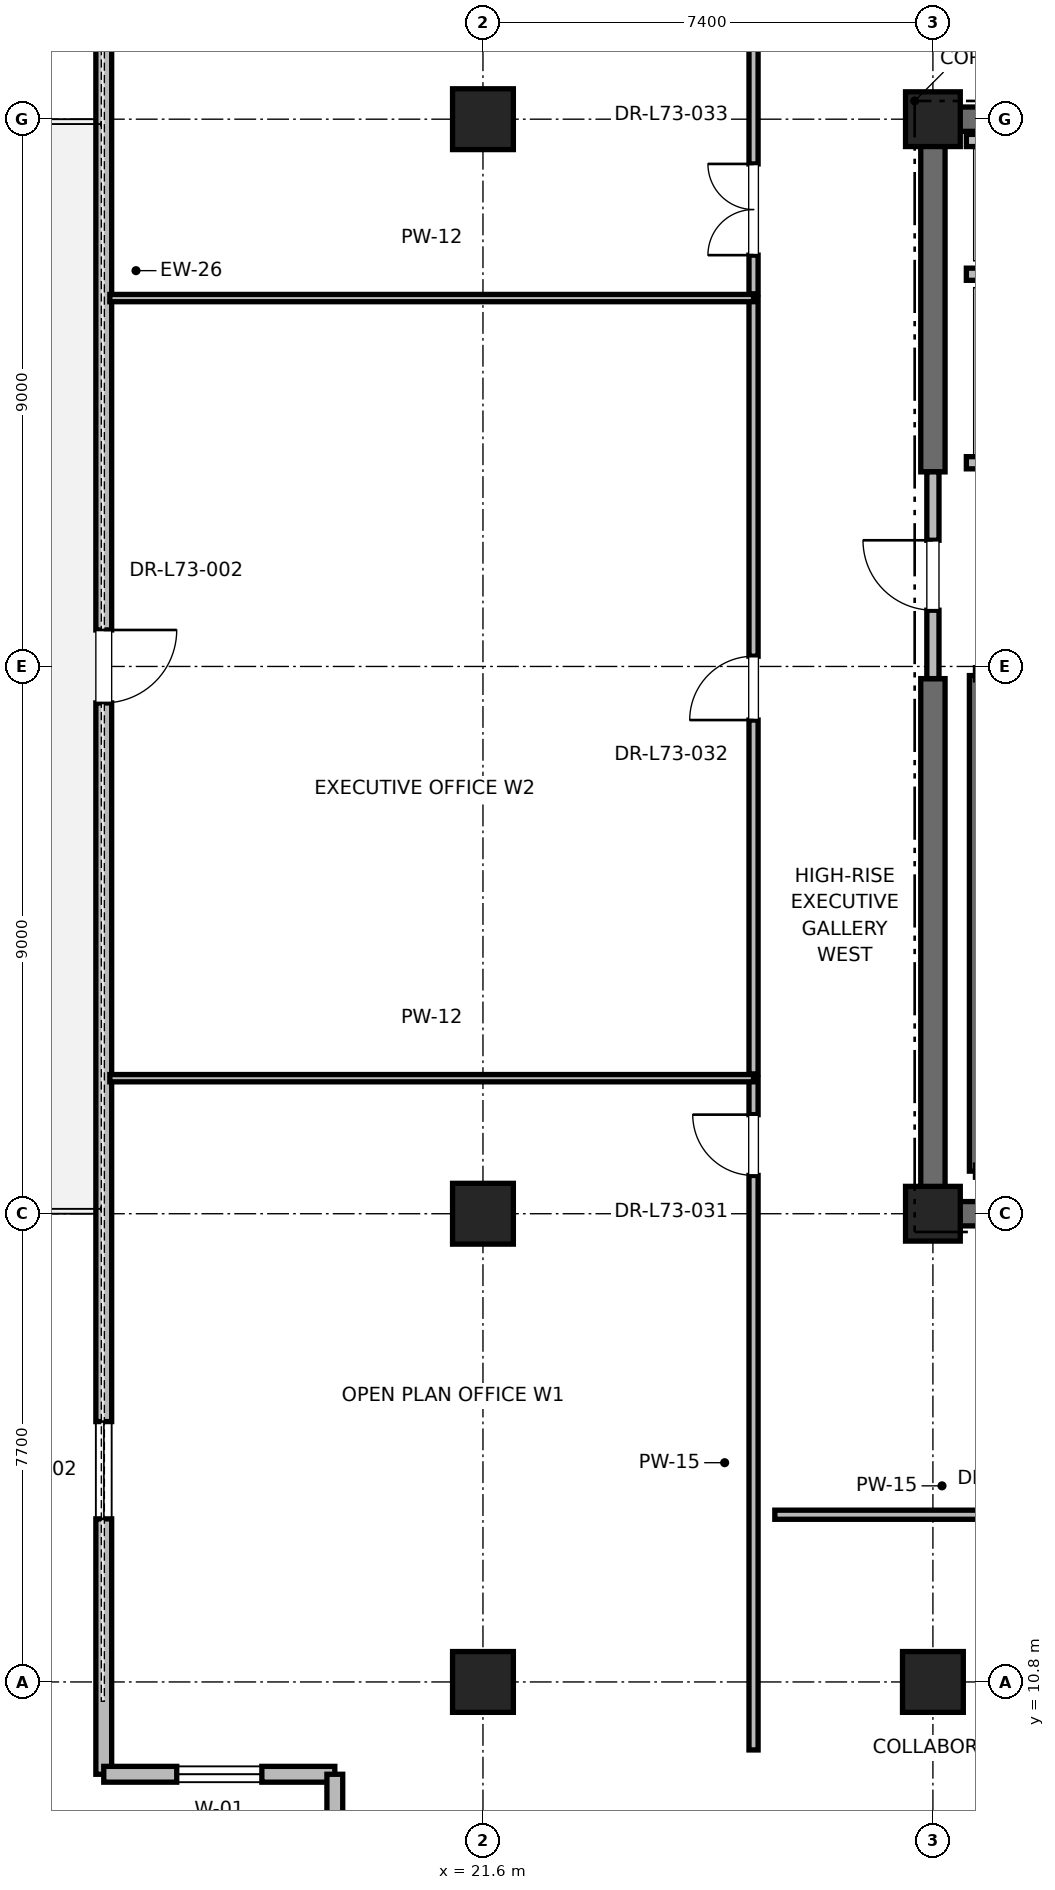
"""IFC4 building model, lengths in metres.
Left out: names, types, materials, properties, quantities, classifications, styles, units other than length and angle.
Written with IfcOpenShell. Run it as: python <this file> out.ifc"""

import sys

from ifc_helpers import new_model, si_unit, direction, frame, frame_2d, origin, origin_2d, place, context, subcontext, project, spatial, rectangle, extrude, element, fill, save


model = new_model("IFC4")
c1 = context("Model", 3, precision=1e-05, world=origin(), true_north=direction((0.0, 1.0)))
c2 = subcontext(c1, "Body", "Model", "MODEL_VIEW")
j1 = project(units=[si_unit("LENGTHUNIT", "METRE"), si_unit("PLANEANGLEUNIT", "RADIAN")], contexts=[c1])
p1 = place(None, origin())
s1 = spatial("IfcSite", under=j1, at=p1, CompositionType="ELEMENT")
p2 = place(p1, origin())
s2 = spatial("IfcBuilding", under=s1, at=p2, CompositionType="ELEMENT")
p3 = place(p2, frame((0.0, 0.0, 314.8)))
s3 = spatial("IfcBuildingStorey", under=s2, at=p3, CompositionType="ELEMENT", Elevation=314.8)
for number, where, z_axis, x_axis in (
    (1, (29.0, 10.8, 0.0), (0.0, 0.0, 1.0), (1.0, 0.0, 0.0)),
    (2, (21.6, 18.5, 0.0), (0.0, 0.0, 1.0), (1.0, 0.0, 0.0)),
    (3, (21.6, 36.5, 0.0), (0.0, 0.0, 1.0), (1.0, 0.0, 0.0)),
    (4, (21.6, 10.8, 0.0), (0.0, 0.0, 1.0), (1.0, 0.0, 0.0)),
):
    element("IfcColumn", number, at=place(p3, frame(where, z_axis=z_axis, x_axis=x_axis)), inside=s3, PredefinedType="COLUMN", context=c2, shape_type="SweptSolid", body=[
        extrude(rectangle(XDim=1.0, YDim=1.0, at=origin_2d()), origin(), (0.0, 0.0, 1.0), 4.0),
    ])
for number, where, z_axis, x_axis in (
    (5, (29.0, 18.5, 0.0), (0.0, 0.0, 1.0), (1.0, 0.0, 0.0)),
    (6, (29.0, 36.5, 0.0), (0.0, 0.0, 1.0), (1.0, 0.0, 0.0)),
):
    element("IfcColumn", number, at=place(p3, frame(where, z_axis=z_axis, x_axis=x_axis)), inside=s3, PredefinedType="PILASTER", context=c2, shape_type="SweptSolid", body=[
        extrude(rectangle(XDim=0.9, YDim=0.9, at=origin_2d()), origin(), (0.0, 0.0, 1.0), 4.0),
    ])
p4 = place(p3, frame((29.0, 18.5, 0.0), z_axis=(0.0, 0.0, 1.0), x_axis=(1.0, 0.0, 0.0)))
e7 = element("IfcWall", 7, at=p4, inside=s3, PredefinedType="SHEAR", context=c2, shape_type="SweptSolid", body=[
    extrude(rectangle(XDim=9.2, YDim=0.4, at=frame_2d((4.6, 0.0))), origin(), (0.0, 0.0, 1.0), 3.785),
])
p5 = place(p3, frame((29.0, 36.5, 0.0), z_axis=(0.0, 0.0, 1.0), x_axis=(1.0, 0.0, 0.0)))
e8 = element("IfcWall", 8, at=p5, inside=s3, PredefinedType="SHEAR", context=c2, shape_type="SweptSolid", body=[
    extrude(rectangle(XDim=5.8, YDim=0.4, at=frame_2d((2.9, 0.0))), origin(), (0.0, 0.0, 1.0), 3.785),
])
p6 = place(p3, frame((29.0, 18.5, 0.0), z_axis=(0.0, 0.0, 1.0), x_axis=(0.0, 1.0, 0.0)))
e9 = element("IfcWall", 9, at=p6, inside=s3, PredefinedType="SHEAR", context=c2, shape_type="SweptSolid", body=[
    extrude(rectangle(XDim=8.8, YDim=0.4, at=frame_2d((4.4, 0.0))), origin(), (0.0, 0.0, 1.0), 3.785),
])
p7 = place(p3, frame((29.0, 30.7, 0.0), z_axis=(0.0, 0.0, 1.0), x_axis=(0.0, 1.0, 0.0)))
e10 = element("IfcWall", 10, at=p7, inside=s3, PredefinedType="SHEAR", context=c2, shape_type="SweptSolid", body=[
    extrude(rectangle(XDim=5.8, YDim=0.4, at=frame_2d((2.9, 0.0))), origin(), (0.0, 0.0, 1.0), 3.785),
])
p8 = place(p3, frame((15.364, 45.718, 0.0), z_axis=(0.0, 0.0, 1.0), x_axis=(0.0, -1.0, 0.0)))
e11 = element("IfcWall", 11, at=p8, inside=s3, PredefinedType="PARAPET", context=c2, shape_type="SweptSolid", body=[
    extrude(rectangle(XDim=36.437, YDim=0.26, at=frame_2d((18.218, 0.0))), origin(), (0.0, 0.0, 1.0), 3.196),
])
p9 = place(p8, frame((4.2, 0.0, 0.85)))
e12 = element("IfcOpeningElement", 12, at=p9, cuts=e11, PredefinedType="OPENING", context=c2, shape_type="SweptSolid", body=[
    extrude(rectangle(XDim=1.6, YDim=2.1, at=frame_2d((0.8, 1.05))), frame((0.0, 0.13, 0.0), z_axis=(0.0, -1.0, 0.0), x_axis=(1.0, 0.0, 0.0)), (0.0, 0.0, 1.0), 0.26),
])
p10 = place(p8, frame((17.618, 0.0, 0.0)))
e13 = element("IfcOpeningElement", 13, at=p10, cuts=e11, PredefinedType="OPENING", context=c2, shape_type="SweptSolid", body=[
    extrude(rectangle(XDim=1.2, YDim=2.2, at=frame_2d((0.6, 1.1))), frame((0.0, 0.13, 0.0), z_axis=(0.0, -1.0, 0.0), x_axis=(1.0, 0.0, 0.0)), (0.0, 0.0, 1.0), 0.26),
])
p11 = place(p8, frame((30.636, 0.0, 0.85)))
e14 = element("IfcOpeningElement", 14, at=p11, cuts=e11, PredefinedType="OPENING", context=c2, shape_type="SweptSolid", body=[
    extrude(rectangle(XDim=1.6, YDim=2.1, at=frame_2d((0.8, 1.05))), frame((0.0, 0.13, 0.0), z_axis=(0.0, -1.0, 0.0), x_axis=(1.0, 0.0, 0.0)), (0.0, 0.0, 1.0), 0.26),
])
p12 = place(p3, frame((15.364, 9.282, 0.0), z_axis=(0.0, 0.0, 1.0), x_axis=(1.0, 0.0, 0.0)))
e15 = element("IfcWall", 15, at=p12, inside=s3, PredefinedType="PARAPET", context=c2, shape_type="SweptSolid", body=[
    extrude(rectangle(XDim=3.8, YDim=0.26, at=frame_2d((1.9, 0.0))), origin(), (0.0, 0.0, 1.0), 3.785),
])
p13 = place(p12, frame((1.2, 0.0, 0.85)))
e16 = element("IfcOpeningElement", 16, at=p13, cuts=e15, PredefinedType="OPENING", context=c2, shape_type="SweptSolid", body=[
    extrude(rectangle(XDim=1.4, YDim=2.0, at=frame_2d((0.7, 1.0))), frame((0.0, 0.13, 0.0), z_axis=(0.0, -1.0, 0.0), x_axis=(1.0, 0.0, 0.0)), (0.0, 0.0, 1.0), 0.26),
])
p14 = place(p3, frame((19.164, 9.282, 0.0), z_axis=(0.0, 0.0, 1.0), x_axis=(0.0, -1.0, 0.0)))
e17 = element("IfcWall", 17, at=p14, inside=s3, PredefinedType="PARAPET", context=c2, shape_type="SweptSolid", body=[
    extrude(rectangle(XDim=3.3, YDim=0.26, at=frame_2d((1.65, 0.0))), origin(), (0.0, 0.0, 1.0), 3.785),
])
p15 = place(p3, frame((29.7, 19.2, 0.0), z_axis=(0.0, 0.0, 1.0), x_axis=(0.0, 1.0, 0.0)))
e18 = element("IfcWall", 18, at=p15, inside=s3, PredefinedType="SOLIDWALL", context=c2, shape_type="SweptSolid", body=[
    extrude(rectangle(XDim=8.15, YDim=0.2, at=frame_2d((4.075, 0.0))), origin(), (0.0, 0.0, 1.0), 3.785),
])
p16 = place(p3, frame((29.0, 27.3, 0.0), z_axis=(0.0, 0.0, 1.0), x_axis=(0.0, 1.0, 0.0)))
e19 = element("IfcWall", 19, at=p16, inside=s3, PredefinedType="PARTITIONING", context=c2, shape_type="SweptSolid", body=[
    extrude(rectangle(XDim=3.4, YDim=0.2, at=frame_2d((1.7, 0.0))), origin(), (0.0, 0.0, 1.0), 2.865),
])
p17 = place(p16, frame((1.125, 0.0, 0.0)))
e20 = element("IfcOpeningElement", 20, at=p17, cuts=e19, PredefinedType="OPENING", context=c2, shape_type="SweptSolid", body=[
    extrude(rectangle(XDim=1.15, YDim=2.2, at=frame_2d((0.575, 1.1))), frame((0.0, 0.1, 0.0), z_axis=(0.0, -1.0, 0.0), x_axis=(1.0, 0.0, 0.0)), (0.0, 0.0, 1.0), 0.2),
])
p18 = place(p3, frame((29.55, 30.85, 0.0), z_axis=(0.0, 0.0, 1.0), x_axis=(1.0, 0.0, 0.0)))
e21 = element("IfcWall", 21, at=p18, inside=s3, PredefinedType="SOLIDWALL", context=c2, shape_type="SweptSolid", body=[
    extrude(rectangle(XDim=2.6, YDim=0.2, at=frame_2d((1.3, 0.0))), origin(), (0.0, 0.0, 1.0), 2.865),
])
p19 = place(p18, frame((0.75, 0.0, 0.0)))
e22 = element("IfcOpeningElement", 22, at=p19, cuts=e21, PredefinedType="OPENING", context=c2, shape_type="SweptSolid", body=[
    extrude(rectangle(XDim=1.1, YDim=2.2, at=frame_2d((0.55, 1.1))), frame((0.0, 0.1, 0.0), z_axis=(0.0, -1.0, 0.0), x_axis=(1.0, 0.0, 0.0)), (0.0, 0.0, 1.0), 0.2),
])
p20 = place(p3, frame((29.55, 33.95, 0.0), z_axis=(0.0, 0.0, 1.0), x_axis=(1.0, 0.0, 0.0)))
e23 = element("IfcWall", 23, at=p20, inside=s3, PredefinedType="SOLIDWALL", context=c2, shape_type="SweptSolid", body=[
    extrude(rectangle(XDim=2.8, YDim=0.2, at=frame_2d((1.4, 0.0))), origin(), (0.0, 0.0, 1.0), 3.785),
])
p21 = place(p3, frame((32.35, 36.15, 0.0), z_axis=(0.0, 0.0, 1.0), x_axis=(-1.0, 0.0, 0.0)))
e24 = element("IfcWall", 24, at=p21, inside=s3, PredefinedType="SOLIDWALL", context=c2, shape_type="SweptSolid", body=[
    extrude(rectangle(XDim=2.8, YDim=0.2, at=frame_2d((1.4, 0.0))), origin(), (0.0, 0.0, 1.0), 3.22),
])
p22 = place(p3, frame((26.4, 13.55, 0.0), z_axis=(0.0, 0.0, 1.0), x_axis=(1.0, 0.0, 0.0)))
e25 = element("IfcWall", 25, at=p22, inside=s3, PredefinedType="PARTITIONING", context=c2, shape_type="SweptSolid", body=[
    extrude(rectangle(XDim=11.968, YDim=0.15, at=frame_2d((5.984, 0.0))), origin(), (0.0, 0.0, 1.0), 2.85),
])
p23 = place(p22, frame((5.499, 0.0, 0.0)))
e26 = element("IfcOpeningElement", 26, at=p23, cuts=e25, PredefinedType="OPENING", context=c2, shape_type="SweptSolid", body=[
    extrude(rectangle(XDim=1.0, YDim=2.15, at=frame_2d((0.5, 1.075))), frame((0.0, 0.075, 0.0), z_axis=(0.0, -1.0, 0.0), x_axis=(1.0, 0.0, 0.0)), (0.0, 0.0, 1.0), 0.15),
])
p24 = place(p3, frame((26.05, 9.682, 0.0), z_axis=(0.0, 0.0, 1.0), x_axis=(0.0, 1.0, 0.0)))
e27 = element("IfcWall", 27, at=p24, inside=s3, PredefinedType="PARTITIONING", context=c2, shape_type="SweptSolid", body=[
    extrude(rectangle(XDim=11.047, YDim=0.15, at=frame_2d((5.523, 0.0))), origin(), (0.0, 0.0, 1.0), 2.85),
])
p25 = place(p24, frame((9.448, 0.0, 0.0)))
e28 = element("IfcOpeningElement", 28, at=p25, cuts=e27, PredefinedType="OPENING", context=c2, shape_type="SweptSolid", body=[
    extrude(rectangle(XDim=1.0, YDim=2.15, at=frame_2d((0.5, 1.075))), frame((0.0, 0.075, 0.0), z_axis=(0.0, -1.0, 0.0), x_axis=(1.0, 0.0, 0.0)), (0.0, 0.0, 1.0), 0.15),
])
p26 = place(p3, frame((15.464, 20.729, 0.0), z_axis=(0.0, 0.0, 1.0), x_axis=(1.0, 0.0, 0.0)))
e29 = element("IfcWall", 29, at=p26, inside=s3, PredefinedType="PARTITIONING", context=c2, shape_type="SweptSolid", body=[
    extrude(rectangle(XDim=10.586, YDim=0.12, at=frame_2d((5.293, 0.0))), origin(), (0.0, 0.0, 1.0), 2.85),
])
p27 = place(p3, frame((26.05, 20.799, 0.0), z_axis=(0.0, 0.0, 1.0), x_axis=(0.0, 1.0, 0.0)))
e30 = element("IfcWall", 30, at=p27, inside=s3, PredefinedType="PARTITIONING", context=c2, shape_type="SweptSolid", body=[
    extrude(rectangle(XDim=12.759, YDim=0.15, at=frame_2d((6.379, 0.0))), origin(), (0.0, 0.0, 1.0), 2.85),
])
p28 = place(p27, frame((5.82, 0.0, 0.0)))
e31 = element("IfcOpeningElement", 31, at=p28, cuts=e30, PredefinedType="OPENING", context=c2, shape_type="SweptSolid", body=[
    extrude(rectangle(XDim=1.05, YDim=2.2, at=frame_2d((0.525, 1.1))), frame((0.0, 0.075, 0.0), z_axis=(0.0, -1.0, 0.0), x_axis=(1.0, 0.0, 0.0)), (0.0, 0.0, 1.0), 0.15),
])
p29 = place(p3, frame((15.464, 33.558, 0.0), z_axis=(0.0, 0.0, 1.0), x_axis=(1.0, 0.0, 0.0)))
e32 = element("IfcWall", 32, at=p29, inside=s3, PredefinedType="PARTITIONING", context=c2, shape_type="SweptSolid", body=[
    extrude(rectangle(XDim=10.586, YDim=0.12, at=frame_2d((5.293, 0.0))), origin(), (0.0, 0.0, 1.0), 2.85),
])
p30 = place(p3, frame((26.05, 33.628, 0.0), z_axis=(0.0, 0.0, 1.0), x_axis=(0.0, 1.0, 0.0)))
e33 = element("IfcWall", 33, at=p30, inside=s3, PredefinedType="PARTITIONING", context=c2, shape_type="SweptSolid", body=[
    extrude(rectangle(XDim=11.69, YDim=0.15, at=frame_2d((5.845, 0.0))), origin(), (0.0, 0.0, 1.0), 2.85),
])
p31 = place(p30, frame((0.636, 0.0, 0.0)))
e34 = element("IfcOpeningElement", 34, at=p31, cuts=e33, PredefinedType="OPENING", context=c2, shape_type="SweptSolid", body=[
    extrude(rectangle(XDim=1.5, YDim=2.25, at=frame_2d((0.75, 1.125))), frame((0.0, 0.075, 0.0), z_axis=(0.0, -1.0, 0.0), x_axis=(1.0, 0.0, 0.0)), (0.0, 0.0, 1.0), 0.15),
])
p32 = place(p10, origin())
e35 = element("IfcDoor", 35, at=p32, inside=s3, OperationType="SINGLE_SWING_LEFT", PredefinedType="DOOR", context=c2, shape_type="SweptSolid", body=[
    extrude(rectangle(XDim=1.2, YDim=2.2, at=frame_2d((0.6, 1.1))), frame((0.0, 0.025, 0.0), z_axis=(0.0, -1.0, 0.0), x_axis=(1.0, 0.0, 0.0)), (0.0, 0.0, 1.0), 0.05),
])
fill(e13, e35)
p33 = place(p11, origin())
e36 = element("IfcWindow", 36, at=p33, inside=s3, PartitioningType="SINGLE_PANEL", PredefinedType="WINDOW", context=c2, shape_type="SweptSolid", body=[
    extrude(rectangle(XDim=1.6, YDim=2.1, at=frame_2d((0.8, 1.05))), frame((0.0, 0.03, 0.0), z_axis=(0.0, -1.0, 0.0), x_axis=(1.0, 0.0, 0.0)), (0.0, 0.0, 1.0), 0.06),
])
fill(e14, e36)
p34 = place(p13, origin())
e37 = element("IfcWindow", 37, at=p34, inside=s3, PartitioningType="SINGLE_PANEL", PredefinedType="WINDOW", context=c2, shape_type="SweptSolid", body=[
    extrude(rectangle(XDim=1.4, YDim=2.0, at=frame_2d((0.7, 1.0))), frame((0.0, 0.03, 0.0), z_axis=(0.0, -1.0, 0.0), x_axis=(1.0, 0.0, 0.0)), (0.0, 0.0, 1.0), 0.06),
])
fill(e16, e37)
p35 = place(p17, origin())
e38 = element("IfcDoor", 38, at=p35, inside=s3, OperationType="SINGLE_SWING_RIGHT", PredefinedType="DOOR", context=c2, shape_type="SweptSolid", body=[
    extrude(rectangle(XDim=1.15, YDim=2.2, at=frame_2d((0.575, 1.1))), frame((0.0, 0.025, 0.0), z_axis=(0.0, -1.0, 0.0), x_axis=(1.0, 0.0, 0.0)), (0.0, 0.0, 1.0), 0.05),
])
fill(e20, e38)
p36 = place(p25, origin())
e39 = element("IfcDoor", 39, at=p36, inside=s3, OperationType="SINGLE_SWING_RIGHT", PredefinedType="DOOR", context=c2, shape_type="SweptSolid", body=[
    extrude(rectangle(XDim=1.0, YDim=2.15, at=frame_2d((0.5, 1.075))), frame((0.0, 0.025, 0.0), z_axis=(0.0, -1.0, 0.0), x_axis=(1.0, 0.0, 0.0)), (0.0, 0.0, 1.0), 0.05),
])
fill(e28, e39)
p37 = place(p28, origin())
e40 = element("IfcDoor", 40, at=p37, inside=s3, OperationType="SINGLE_SWING_LEFT", PredefinedType="DOOR", context=c2, shape_type="SweptSolid", body=[
    extrude(rectangle(XDim=1.05, YDim=2.2, at=frame_2d((0.525, 1.1))), frame((0.0, 0.025, 0.0), z_axis=(0.0, -1.0, 0.0), x_axis=(1.0, 0.0, 0.0)), (0.0, 0.0, 1.0), 0.05),
])
fill(e31, e40)
p38 = place(p31, origin())
e41 = element("IfcDoor", 41, at=p38, inside=s3, OperationType="DOUBLE_DOOR_SINGLE_SWING", PredefinedType="DOOR", context=c2, shape_type="SweptSolid", body=[
    extrude(rectangle(XDim=1.5, YDim=2.25, at=frame_2d((0.75, 1.125))), frame((0.0, 0.025, 0.0), z_axis=(0.0, -1.0, 0.0), x_axis=(1.0, 0.0, 0.0)), (0.0, 0.0, 1.0), 0.05),
])
fill(e34, e41)
save(model, sys.argv[1])
